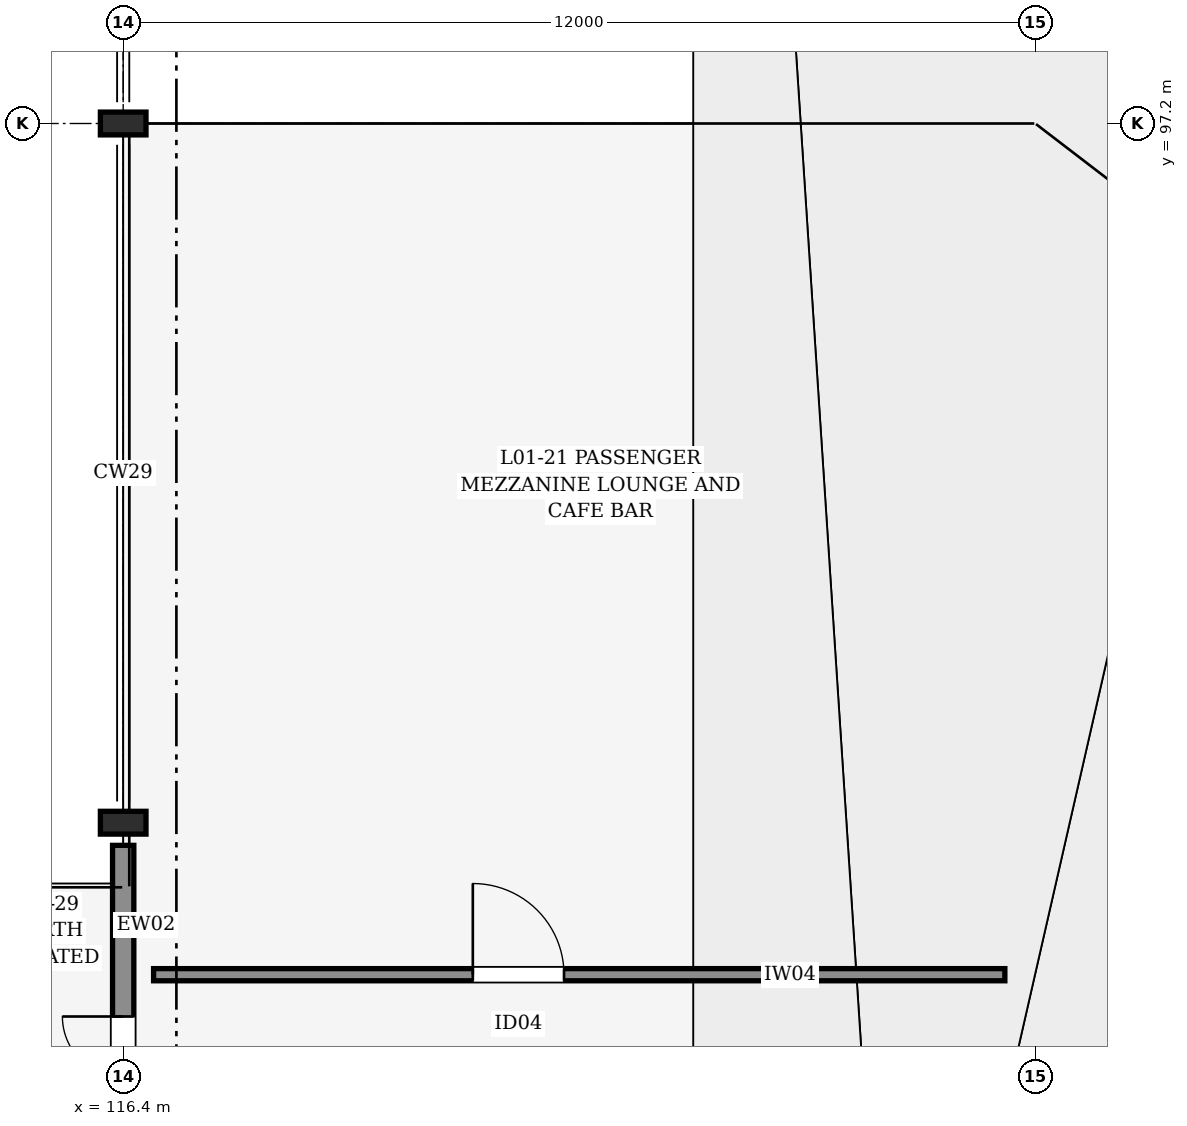
"""IFC4 building model, lengths in metres.
Left out: names, types, materials, properties, quantities, classifications, styles, units other than length and angle.
Written with IfcOpenShell. Run it as: python <this file> out.ifc"""

import sys

from ifc_helpers import new_model, si_unit, direction, frame, frame_2d, origin, origin_2d, place, context, subcontext, project, spatial, rectangle, i_section, extrude, element, fill, save


model = new_model("IFC4")
c1 = context("Model", 3, precision=1e-05, world=origin(), true_north=direction((0.0, 1.0)))
c2 = subcontext(c1, "Body", "Model", "MODEL_VIEW")
j1 = project(units=[si_unit("LENGTHUNIT", "METRE"), si_unit("PLANEANGLEUNIT", "RADIAN")], contexts=[c1])
p1 = place(None, origin())
s1 = spatial("IfcSite", under=j1, at=p1, CompositionType="ELEMENT")
p2 = place(p1, origin())
s2 = spatial("IfcBuilding", under=s1, at=p2, CompositionType="ELEMENT")
p3 = place(p2, frame((0.0, 0.0, 5.4)))
s3 = spatial("IfcBuildingStorey", under=s2, at=p3, CompositionType="ELEMENT", Elevation=5.4)
for number, where, z_axis, x_axis in (
    (1, (116.4, 88.0, 0.0), (0.0, 0.0, 1.0), (1.0, 0.0, 0.0)),
    (2, (116.4, 97.2, 0.0), (0.0, 0.0, 1.0), (1.0, 0.0, 0.0)),
):
    element("IfcColumn", number, at=place(p3, frame(where, z_axis=z_axis, x_axis=x_axis)), inside=s3, PredefinedType="COLUMN", context=c2, shape_type="SweptSolid", body=[
        extrude(i_section(OverallWidth=0.3, OverallDepth=0.6, WebThickness=0.015, FlangeThickness=0.03, FilletRadius=0.027, at=origin_2d()), origin(), (0.0, 0.0, 1.0), 6.0),
    ])
p4 = place(p3, frame((116.4, 81.6, 0.0), z_axis=(0.0, 0.0, 1.0), x_axis=(0.0, 1.0, 0.0)))
e3 = element("IfcWall", 3, at=p4, inside=s3, PredefinedType="STANDARD", context=c2, shape_type="SweptSolid", body=[
    extrude(rectangle(XDim=6.102, YDim=0.28, at=frame_2d((3.051, 0.0))), origin(), (0.0, 0.0, 1.0), 2.535),
])
p5 = place(p4, frame((2.25, 0.0, 0.0)))
e4 = element("IfcOpeningElement", 4, at=p5, cuts=e3, PredefinedType="OPENING", context=c2, shape_type="SweptSolid", body=[
    extrude(rectangle(XDim=1.6, YDim=2.2, at=frame_2d((0.8, 1.1))), frame((0.0, 0.15, 0.0), z_axis=(0.0, -1.0, 0.0), x_axis=(1.0, 0.0, 0.0)), (0.0, 0.0, 1.0), 0.3),
])
p6 = place(p3, frame((116.8, 86.0, 0.0), z_axis=(0.0, 0.0, 1.0), x_axis=(1.0, 0.0, 0.0)))
e5 = element("IfcWall", 5, at=p6, inside=s3, PredefinedType="PARTITIONING", context=c2, shape_type="SweptSolid", body=[
    extrude(rectangle(XDim=11.2, YDim=0.16, at=frame_2d((5.6, 0.0))), origin(), (0.0, 0.0, 1.0), 2.525),
])
p7 = place(p6, frame((4.2, 0.0, 0.0)))
e6 = element("IfcOpeningElement", 6, at=p7, cuts=e5, PredefinedType="OPENING", context=c2, shape_type="SweptSolid", body=[
    extrude(rectangle(XDim=1.2, YDim=2.15, at=frame_2d((0.6, 1.075))), frame((0.0, 0.09, 0.0), z_axis=(0.0, -1.0, 0.0), x_axis=(1.0, 0.0, 0.0)), (0.0, 0.0, 1.0), 0.18),
])
p8 = place(p5, origin())
e7 = element("IfcDoor", 7, at=p8, inside=s3, OperationType="DOUBLE_DOOR_SINGLE_SWING", PredefinedType="DOOR", context=c2, shape_type="SweptSolid", body=[
    extrude(rectangle(XDim=1.6, YDim=2.2, at=frame_2d((0.8, 1.1))), frame((0.0, 0.025, 0.0), z_axis=(0.0, -1.0, 0.0), x_axis=(1.0, 0.0, 0.0)), (0.0, 0.0, 1.0), 0.05),
])
fill(e4, e7)
p9 = place(p7, origin())
e8 = element("IfcDoor", 8, at=p9, inside=s3, OperationType="SINGLE_SWING_LEFT", PredefinedType="DOOR", context=c2, shape_type="SweptSolid", body=[
    extrude(rectangle(XDim=1.2, YDim=2.15, at=frame_2d((0.6, 1.075))), frame((0.0, 0.025, 0.0), z_axis=(0.0, -1.0, 0.0), x_axis=(1.0, 0.0, 0.0)), (0.0, 0.0, 1.0), 0.05),
])
fill(e6, e8)
save(model, sys.argv[1])
